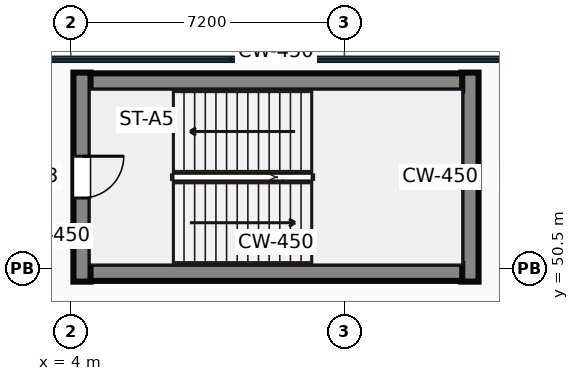
"""IFC4 building model, lengths in metres.
Left out: names, types, materials, properties, quantities, classifications, styles, units other than length and angle.
Written with IfcOpenShell. Run it as: python <this file> out.ifc"""

import sys

from ifc_helpers import new_model, si_unit, direction, frame, frame_2d, origin, place, context, subcontext, project, spatial, rectangle, extrude, source, transform, mapped, element, fill, save


model = new_model("IFC4")
c1 = context("Model", 3, precision=1e-05, world=origin(), true_north=direction((0.0, 1.0)))
c2 = subcontext(c1, "Body", "Model", "MODEL_VIEW")
j1 = project(units=[si_unit("LENGTHUNIT", "METRE"), si_unit("PLANEANGLEUNIT", "RADIAN")], contexts=[c1])
p1 = place(None, origin())
s1 = spatial("IfcSite", under=j1, at=p1, CompositionType="ELEMENT")
p2 = place(p1, origin())
s2 = spatial("IfcBuilding", under=s1, at=p2, CompositionType="ELEMENT")
p3 = place(p2, frame((0.0, 0.0, 6.0)))
s3 = spatial("IfcBuildingStorey", under=s2, at=p3, CompositionType="ELEMENT", Elevation=6.0)
m1 = source(origin(), c2, "Body", "SweptSolid", [
    extrude(rectangle(XDim=5.5, YDim=0.45, at=frame_2d((2.75, 0.0))), origin(), (0.0, 0.0, 1.0), 5.0),
])
p4 = place(p3, frame((4.295, 50.15, 0.0), z_axis=(0.0, 0.0, 1.0), x_axis=(0.0, 1.0, 0.0)))
e1 = element("IfcWall", 1, at=p4, inside=s3, PredefinedType="SHEAR", context=c2, shape_type="MappedRepresentation", body=[
    mapped(m1, transform((0.0, 0.0, 0.0))),
])
p5 = place(p4, frame((2.2, 0.0, 0.0)))
e2 = element("IfcOpeningElement", 2, at=p5, cuts=e1, PredefinedType="OPENING", context=c2, shape_type="SweptSolid", body=[
    extrude(rectangle(XDim=1.1, YDim=2.15, at=frame_2d((0.55, 1.075))), frame((0.0, 0.235, 0.0), z_axis=(0.0, -1.0, 0.0), x_axis=(1.0, 0.0, 0.0)), (0.0, 0.0, 1.0), 0.47),
])
m2 = source(origin(), c2, "Body", "SweptSolid", [
    extrude(rectangle(XDim=9.8, YDim=0.45, at=frame_2d((4.9, 0.0))), origin(), (0.0, 0.0, 1.0), 5.0),
])
for number, where, z_axis, x_axis in (
    (3, (4.5, 50.395, 0.0), (0.0, 0.0, 1.0), (1.0, 0.0, 0.0)),
    (4, (4.5, 55.405, 0.0), (0.0, 0.0, 1.0), (1.0, 0.0, 0.0)),
):
    element("IfcWall", number, at=place(p3, frame(where, z_axis=z_axis, x_axis=x_axis)), inside=s3, PredefinedType="SHEAR", context=c2, shape_type="MappedRepresentation", body=[
        mapped(m2, transform((0.0, 0.0, 0.0))),
    ])
p6 = place(p3, frame((14.505, 50.15, 0.0), z_axis=(0.0, 0.0, 1.0), x_axis=(0.0, 1.0, 0.0)))
e5 = element("IfcWall", 5, at=p6, inside=s3, PredefinedType="SHEAR", context=c2, shape_type="MappedRepresentation", body=[
    mapped(m1, transform((0.0, 0.0, 0.0))),
])
m3 = source(origin(), c2, "Body", "SweptSolid", [
    extrude(rectangle(XDim=1.1, YDim=2.15, at=frame_2d((0.55, 1.075))), frame((0.0, 0.025, 0.0), z_axis=(0.0, -1.0, 0.0), x_axis=(1.0, 0.0, 0.0)), (0.0, 0.0, 1.0), 0.05),
])
p7 = place(p5, frame((1.1, 0.0, 0.0), z_axis=(0.0, 0.0, 1.0), x_axis=(-1.0, 0.0, 0.0)))
e6 = element("IfcDoor", 6, at=p7, inside=s3, OperationType="SINGLE_SWING_RIGHT", PredefinedType="DOOR", context=c2, shape_type="MappedRepresentation", body=[
    mapped(m3, transform((0.0, 0.0, 0.0))),
])
fill(e2, e6)
save(model, sys.argv[1])
